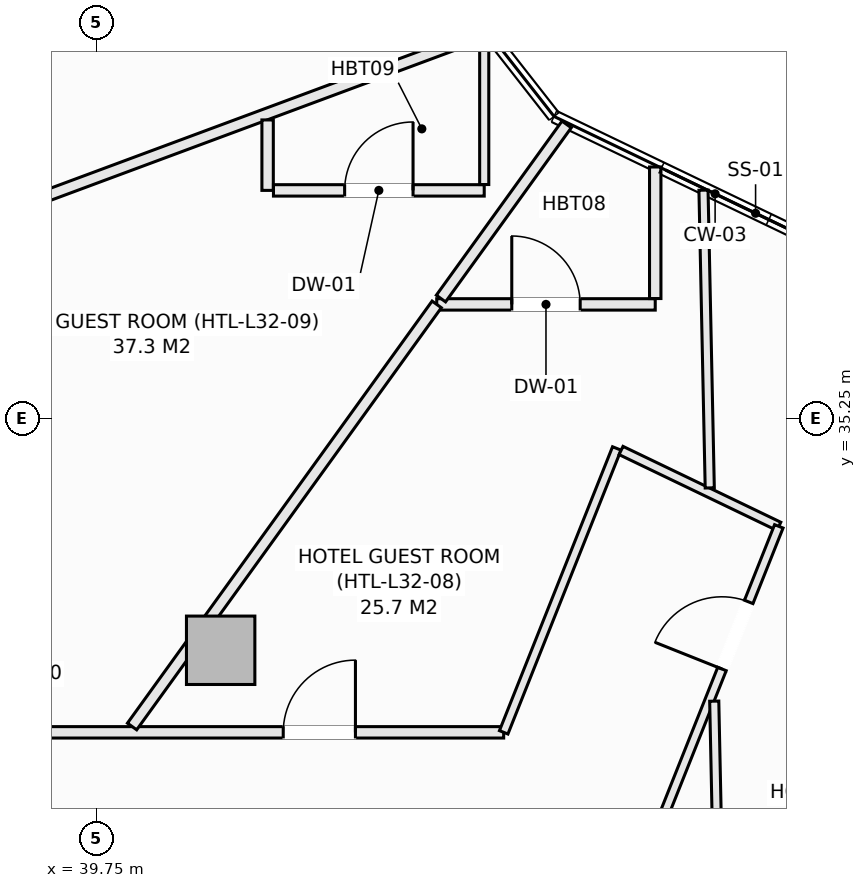
"""IFC4 building model, lengths in metres.
Left out: names, types, materials, properties, quantities, classifications, styles, units other than length and angle.
Written with IfcOpenShell. Run it as: python <this file> out.ifc"""

import sys

from ifc_helpers import new_model, si_unit, direction, frame, frame_2d, origin, origin_2d, place, context, subcontext, project, spatial, rectangle, extrude, element, fill, save


model = new_model("IFC4")
c1 = context("Model", 3, precision=1e-05, world=origin(), true_north=direction((0.0, 1.0)))
c2 = subcontext(c1, "Body", "Model", "MODEL_VIEW")
j1 = project(units=[si_unit("LENGTHUNIT", "METRE"), si_unit("PLANEANGLEUNIT", "RADIAN")], contexts=[c1])
p1 = place(None, origin())
s1 = spatial("IfcSite", under=j1, at=p1, CompositionType="ELEMENT")
p2 = place(p1, origin())
s2 = spatial("IfcBuilding", under=s1, at=p2, CompositionType="ELEMENT")
p3 = place(p2, frame((0.0, 0.0, 129.1)))
s3 = spatial("IfcBuildingStorey", under=s2, at=p3, CompositionType="ELEMENT", Elevation=129.1)
p4 = place(p3, frame((41.382, 32.199, -0.27), z_axis=(0.0, 0.0, 1.0), x_axis=(1.0, 0.0, 0.0)))
e1 = element("IfcColumn", 1, at=p4, inside=s3, PredefinedType="COLUMN", context=c2, shape_type="SweptSolid", body=[
    extrude(rectangle(XDim=0.9, YDim=0.9, at=origin_2d()), origin(), (0.0, 0.0, 1.0), 3.4),
])
p5 = place(p3, frame((38.862, 31.12, 0.0), z_axis=(0.0, 0.0, 1.0), x_axis=(1.0, 0.0, 0.0)))
e2 = element("IfcWall", 2, at=p5, inside=s3, PredefinedType="PARTITIONING", context=c2, shape_type="SweptSolid", body=[
    extrude(rectangle(XDim=6.244, YDim=0.15, at=frame_2d((3.122, 0.0))), origin(), (0.0, 0.0, 1.0), 3.13),
])
p6 = place(p5, frame((3.344, 0.0, 0.0)))
e3 = element("IfcOpeningElement", 3, at=p6, cuts=e2, PredefinedType="OPENING", context=c2, shape_type="SweptSolid", body=[
    extrude(rectangle(XDim=0.95, YDim=2.1, at=frame_2d((0.475, 1.05))), frame((0.0, 0.085, 0.0), z_axis=(0.0, -1.0, 0.0), x_axis=(1.0, 0.0, 0.0)), (0.0, 0.0, 1.0), 0.17),
])
p7 = place(p3, frame((45.106, 31.12, 0.0), z_axis=(0.0, 0.0, 1.0), x_axis=(0.370123465787, 0.928982572535, 0.0)))
e4 = element("IfcWall", 4, at=p7, inside=s3, PredefinedType="PARTITIONING", context=c2, shape_type="SweptSolid", body=[
    extrude(rectangle(XDim=4.02, YDim=0.12, at=frame_2d((2.01, 0.0))), origin(), (0.0, 0.0, 1.0), 3.13),
])
p8 = place(p3, frame((46.65, 34.828, 0.0), z_axis=(0.0, 0.0, 1.0), x_axis=(0.901271525254, -0.433254703109, 0.0)))
e5 = element("IfcWall", 5, at=p8, inside=s3, PredefinedType="PARTITIONING", context=c2, shape_type="SweptSolid", body=[
    extrude(rectangle(XDim=2.304, YDim=0.12, at=frame_2d((1.152, 0.0))), origin(), (0.0, 0.0, 1.0), 3.13),
])
p9 = place(p3, frame((46.946, 29.363, 0.0), z_axis=(0.0, 0.0, 1.0), x_axis=(0.370173596818, 0.928962597858, 0.0)))
e6 = element("IfcWall", 6, at=p9, inside=s3, PredefinedType="PARTITIONING", context=c2, shape_type="SweptSolid", body=[
    extrude(rectangle(XDim=4.809, YDim=0.12, at=frame_2d((2.404, 0.0))), origin(), (0.0, 0.0, 1.0), 3.13),
])
p10 = place(p9, frame((2.788, 0.0, 0.0)))
e7 = element("IfcOpeningElement", 7, at=p10, cuts=e6, PredefinedType="OPENING", context=c2, shape_type="SweptSolid", body=[
    extrude(rectangle(XDim=0.95, YDim=2.1, at=frame_2d((0.475, 1.05))), frame((0.0, 0.07, 0.0), z_axis=(0.0, -1.0, 0.0), x_axis=(1.0, 0.0, 0.0)), (0.0, 0.0, 1.0), 0.14),
])
p11 = place(p3, frame((47.735, 38.253, 0.0), z_axis=(0.0, 0.0, 1.0), x_axis=(0.02106239212, -0.999778163213, 0.0)))
e8 = element("IfcWall", 8, at=p11, inside=s3, PredefinedType="PARTITIONING", context=c2, shape_type="SweptSolid", body=[
    extrude(rectangle(XDim=3.918, YDim=0.12, at=frame_2d((1.959, 0.0))), origin(), (0.0, 0.0, 1.0), 3.13),
])
p12 = place(p3, frame((47.876, 31.53, 0.0), z_axis=(0.0, 0.0, 1.0), x_axis=(0.021060407881, -0.999778205013, 0.0)))
e9 = element("IfcWall", 9, at=p12, inside=s3, PredefinedType="PARTITIONING", context=c2, shape_type="SweptSolid", body=[
    extrude(rectangle(XDim=6.608, YDim=0.12, at=frame_2d((3.304, 0.0))), origin(), (0.0, 0.0, 1.0), 3.13),
])
p13 = place(p3, frame((44.225, 36.75, 0.0), z_axis=(0.0, 0.0, 1.0), x_axis=(1.0, 0.0, 0.0)))
e10 = element("IfcWall", 10, at=p13, inside=s3, PredefinedType="PARTITIONING", context=c2, shape_type="SweptSolid", body=[
    extrude(rectangle(XDim=2.875, YDim=0.15, at=frame_2d((1.438, 0.0))), origin(), (0.0, 0.0, 1.0), 3.13),
])
p14 = place(p13, frame((0.988, 0.0, 0.0)))
e11 = element("IfcOpeningElement", 11, at=p14, cuts=e10, PredefinedType="OPENING", context=c2, shape_type="SweptSolid", body=[
    extrude(rectangle(XDim=0.9, YDim=2.1, at=frame_2d((0.45, 1.05))), frame((0.0, 0.085, 0.0), z_axis=(0.0, -1.0, 0.0), x_axis=(1.0, 0.0, 0.0)), (0.0, 0.0, 1.0), 0.17),
])
p15 = place(p3, frame((47.1, 36.827, 0.0), z_axis=(0.0, 0.0, 1.0), x_axis=(0.0, 1.0, 0.0)))
e12 = element("IfcWall", 12, at=p15, inside=s3, PredefinedType="PARTITIONING", context=c2, shape_type="SweptSolid", body=[
    extrude(rectangle(XDim=1.731, YDim=0.15, at=frame_2d((0.865, 0.0))), origin(), (0.0, 0.0, 1.0), 3.13),
])
p16 = place(p3, frame((40.217, 31.197, 0.0), z_axis=(0.0, 0.0, 1.0), x_axis=(0.585304416837, 0.810813628173, 0.0)))
e13 = element("IfcWall", 13, at=p16, inside=s3, PredefinedType="PARTITIONING", context=c2, shape_type="SweptSolid", body=[
    extrude(rectangle(XDim=6.849, YDim=0.15, at=frame_2d((3.424, 0.0))), origin(), (0.0, 0.0, 1.0), 3.13),
])
p17 = place(p3, frame((44.281, 36.827, 0.0), z_axis=(0.0, 0.0, 1.0), x_axis=(0.585301255108, 0.81081591053, 0.0)))
e14 = element("IfcWall", 14, at=p17, inside=s3, PredefinedType="PARTITIONING", context=c2, shape_type="SweptSolid", body=[
    extrude(rectangle(XDim=2.826, YDim=0.15, at=frame_2d((1.413, 0.0))), origin(), (0.0, 0.0, 1.0), 3.13),
])
p18 = place(p3, frame((32.718, 35.812, 0.0), z_axis=(0.0, 0.0, 1.0), x_axis=(0.937443879907, 0.348136427317, 0.0)))
e15 = element("IfcWall", 15, at=p18, inside=s3, PredefinedType="PARTITIONING", context=c2, shape_type="SweptSolid", body=[
    extrude(rectangle(XDim=12.969, YDim=0.15, at=frame_2d((6.484, 0.0))), origin(), (0.0, 0.0, 1.0), 2.505),
])
p19 = place(p3, frame((42.0, 38.25, 0.0), z_axis=(0.0, 0.0, 1.0), x_axis=(0.0, 1.0, 0.0)))
e16 = element("IfcWall", 16, at=p19, inside=s3, PredefinedType="PARTITIONING", context=c2, shape_type="SweptSolid", body=[
    extrude(rectangle(XDim=0.927, YDim=0.15, at=frame_2d((0.463, 0.0))), origin(), (0.0, 0.0, 1.0), 3.13),
])
p20 = place(p3, frame((42.077, 38.25, 0.0), z_axis=(0.0, 0.0, 1.0), x_axis=(1.0, 0.0, 0.0)))
e17 = element("IfcWall", 17, at=p20, inside=s3, PredefinedType="PARTITIONING", context=c2, shape_type="SweptSolid", body=[
    extrude(rectangle(XDim=2.773, YDim=0.15, at=frame_2d((1.387, 0.0))), origin(), (0.0, 0.0, 1.0), 2.812),
])
p21 = place(p20, frame((0.937, 0.0, 0.0)))
e18 = element("IfcOpeningElement", 18, at=p21, cuts=e17, PredefinedType="OPENING", context=c2, shape_type="SweptSolid", body=[
    extrude(rectangle(XDim=0.9, YDim=2.1, at=frame_2d((0.45, 1.05))), frame((0.0, 0.085, 0.0), z_axis=(0.0, -1.0, 0.0), x_axis=(1.0, 0.0, 0.0)), (0.0, 0.0, 1.0), 0.17),
])
p22 = place(p3, frame((44.85, 38.327, 0.0), z_axis=(0.0, 0.0, 1.0), x_axis=(0.0, 1.0, 0.0)))
e19 = element("IfcWall", 19, at=p22, inside=s3, PredefinedType="PARTITIONING", context=c2, shape_type="SweptSolid", body=[
    extrude(rectangle(XDim=1.908, YDim=0.12, at=frame_2d((0.954, 0.0))), origin(), (0.0, 0.0, 1.0), 3.13),
])
p23 = place(p10, origin())
e20 = element("IfcDoor", 20, at=p23, inside=s3, OperationType="SINGLE_SWING_LEFT", PredefinedType="DOOR", context=c2, shape_type="SweptSolid", body=[
    extrude(rectangle(XDim=0.95, YDim=2.1, at=frame_2d((0.475, 1.05))), frame((0.0, 0.025, 0.0), z_axis=(0.0, -1.0, 0.0), x_axis=(1.0, 0.0, 0.0)), (0.0, 0.0, 1.0), 0.05),
])
fill(e7, e20)
p24 = place(p6, origin())
e21 = element("IfcDoor", 21, at=p24, inside=s3, OperationType="SINGLE_SWING_RIGHT", PredefinedType="DOOR", context=c2, shape_type="SweptSolid", body=[
    extrude(rectangle(XDim=0.95, YDim=2.1, at=frame_2d((0.475, 1.05))), frame((0.0, 0.025, 0.0), z_axis=(0.0, -1.0, 0.0), x_axis=(1.0, 0.0, 0.0)), (0.0, 0.0, 1.0), 0.05),
])
fill(e3, e21)
p25 = place(p14, origin())
e22 = element("IfcDoor", 22, at=p25, inside=s3, OperationType="SINGLE_SWING_LEFT", PredefinedType="DOOR", context=c2, shape_type="SweptSolid", body=[
    extrude(rectangle(XDim=0.9, YDim=2.1, at=frame_2d((0.45, 1.05))), frame((0.0, 0.025, 0.0), z_axis=(0.0, -1.0, 0.0), x_axis=(1.0, 0.0, 0.0)), (0.0, 0.0, 1.0), 0.05),
])
fill(e11, e22)
p26 = place(p21, origin())
e23 = element("IfcDoor", 23, at=p26, inside=s3, OperationType="SINGLE_SWING_RIGHT", PredefinedType="DOOR", context=c2, shape_type="SweptSolid", body=[
    extrude(rectangle(XDim=0.9, YDim=2.1, at=frame_2d((0.45, 1.05))), frame((0.0, 0.025, 0.0), z_axis=(0.0, -1.0, 0.0), x_axis=(1.0, 0.0, 0.0)), (0.0, 0.0, 1.0), 0.05),
])
fill(e18, e23)
save(model, sys.argv[1])
